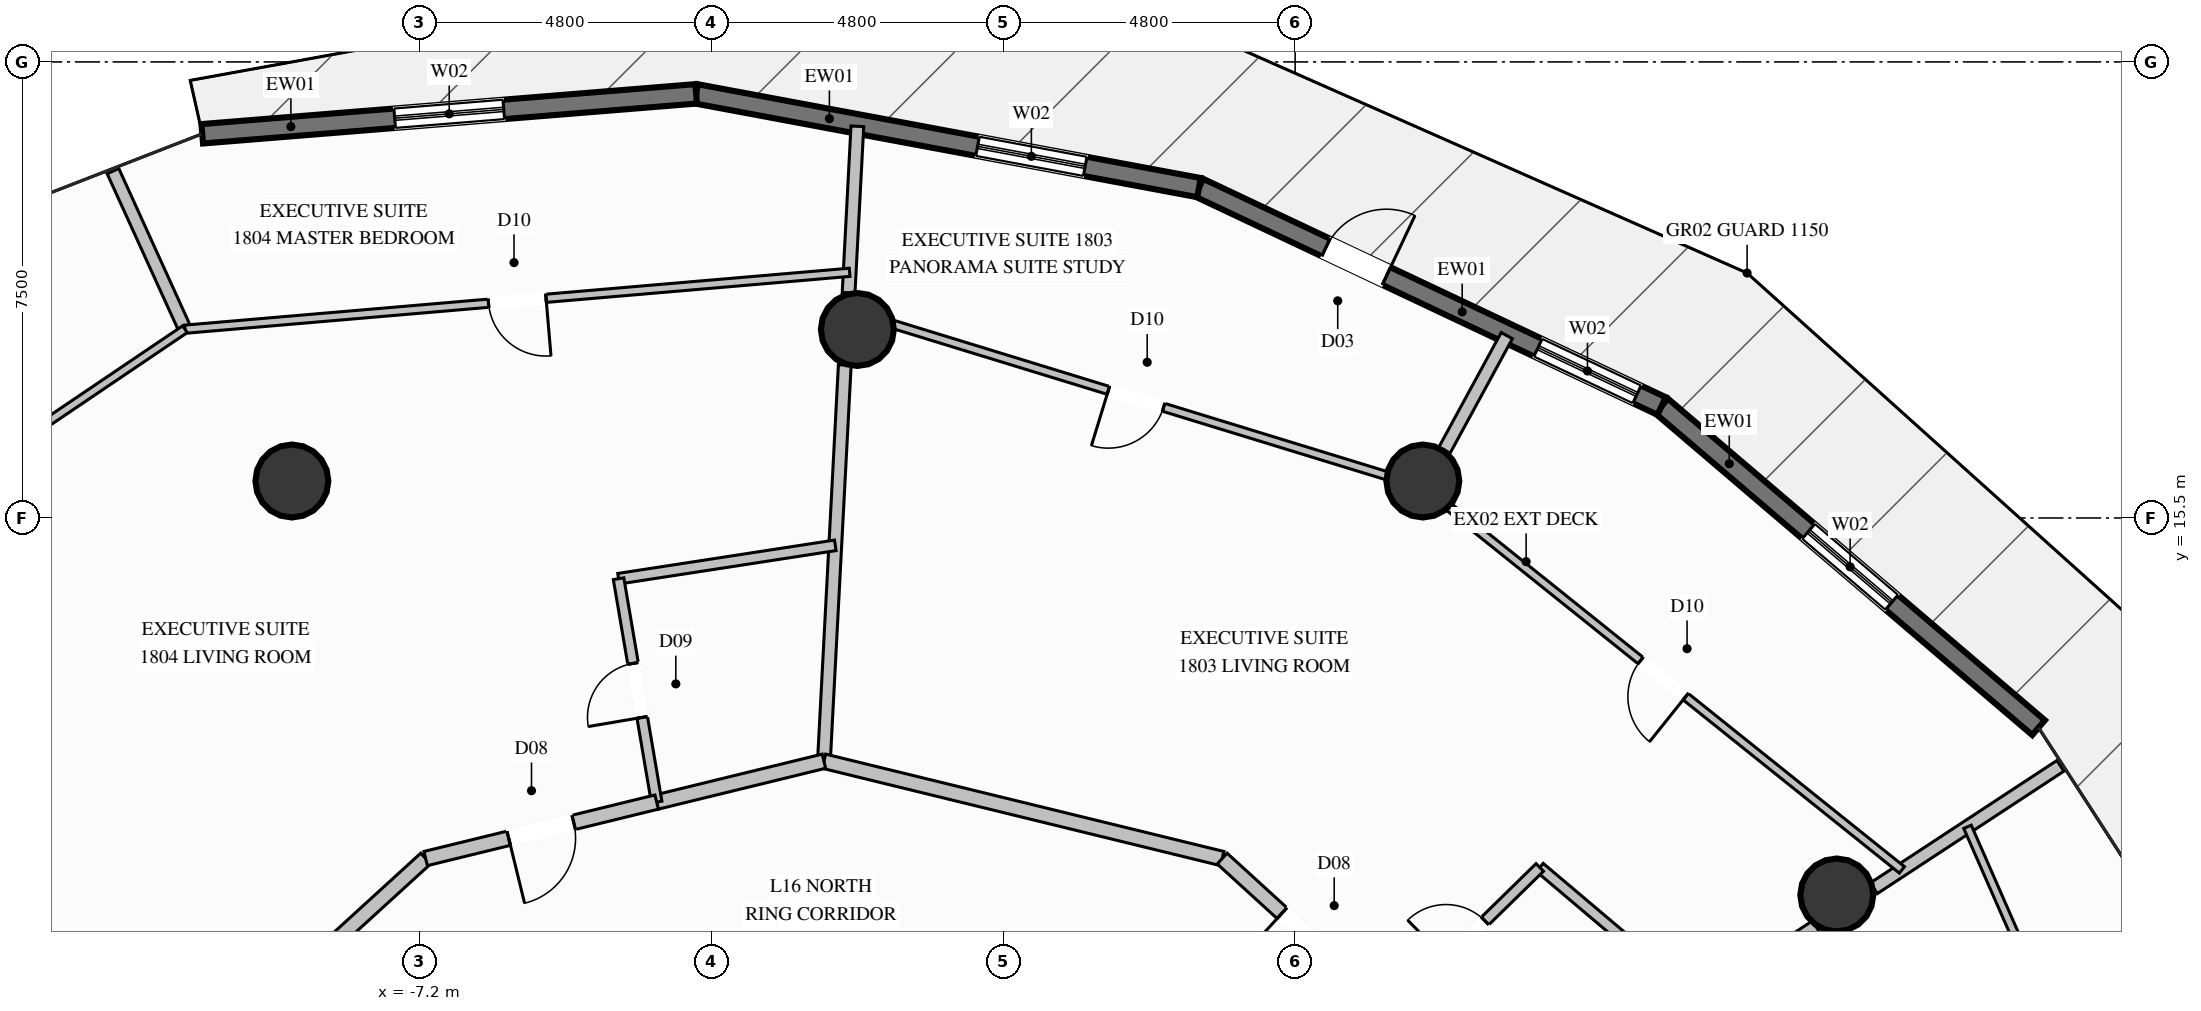
"""IFC4 building model, lengths in metres.
Left out: names, types, materials, properties, quantities, classifications, styles, units other than length and angle.
Written with IfcOpenShell. Run it as: python <this file> out.ifc"""

import sys

from ifc_helpers import new_model, si_unit, direction, frame, frame_2d, origin, origin_2d, place, context, subcontext, project, spatial, rectangle, circle, extrude, element, fill, save


model = new_model("IFC4")
c1 = context("Model", 3, precision=1e-05, world=origin(), true_north=direction((0.0, 1.0)))
c2 = subcontext(c1, "Body", "Model", "MODEL_VIEW")
j1 = project(units=[si_unit("LENGTHUNIT", "METRE"), si_unit("PLANEANGLEUNIT", "RADIAN")], contexts=[c1])
p1 = place(None, origin())
s1 = spatial("IfcSite", under=j1, at=p1, CompositionType="ELEMENT")
p2 = place(p1, origin())
s2 = spatial("IfcBuilding", under=s1, at=p2, CompositionType="ELEMENT")
p3 = place(p2, frame((0.0, 0.0, 68.0)))
s3 = spatial("IfcBuildingStorey", under=s2, at=p3, CompositionType="ELEMENT", Elevation=68.0)
for number, where, z_axis, x_axis in (
    (1, (16.108, 9.3, 0.0), (0.0, 0.0, 1.0), (1.0, 0.0, 0.0)),
    (2, (9.3, 16.108, 0.0), (0.0, 0.0, 1.0), (1.0, 0.0, 0.0)),
    (3, (0.0, 18.6, 0.0), (0.0, 0.0, 1.0), (1.0, 0.0, 0.0)),
    (4, (-9.3, 16.108, 0.0), (0.0, 0.0, 1.0), (1.0, 0.0, 0.0)),
):
    element("IfcColumn", number, at=place(p3, frame(where, z_axis=z_axis, x_axis=x_axis)), inside=s3, PredefinedType="COLUMN", context=c2, shape_type="SweptSolid", body=[
        extrude(circle(Radius=0.6, at=origin_2d()), origin(), (0.0, 0.0, 1.0), 3.6),
    ])
p4 = place(p3, frame((13.227, 17.341, 0.0), z_axis=(0.0, 0.0, 1.0), x_axis=(0.76078130933, -0.649008319958, 0.0)))
e5 = element("IfcWall", 5, at=p4, inside=s3, PredefinedType="SOLIDWALL", context=c2, shape_type="SweptSolid", body=[
    extrude(rectangle(XDim=8.149, YDim=0.32, at=frame_2d((4.075, 0.0))), origin(), (0.0, 0.0, 1.0), 3.34),
])
p5 = place(p4, frame((3.175, 0.0, 0.35)))
e6 = element("IfcOpeningElement", 6, at=p5, cuts=e5, PredefinedType="OPENING", context=c2, shape_type="SweptSolid", body=[
    extrude(rectangle(XDim=1.8, YDim=2.6, at=frame_2d((0.9, 1.3))), frame((0.0, 0.17, 0.0), z_axis=(0.0, -1.0, 0.0), x_axis=(1.0, 0.0, 0.0)), (0.0, 0.0, 1.0), 0.34),
])
p6 = place(p3, frame((5.619, 20.933, 0.0), z_axis=(0.0, 0.0, 1.0), x_axis=(0.904280701051, -0.426938419105, 0.0)))
e7 = element("IfcWall", 7, at=p6, inside=s3, PredefinedType="SOLIDWALL", context=c2, shape_type="SweptSolid", body=[
    extrude(rectangle(XDim=8.414, YDim=0.32, at=frame_2d((4.207, 0.0))), origin(), (0.0, 0.0, 1.0), 3.34),
])
p7 = place(p6, frame((6.165, 0.0, 0.35)))
e8 = element("IfcOpeningElement", 8, at=p7, cuts=e7, PredefinedType="OPENING", context=c2, shape_type="SweptSolid", body=[
    extrude(rectangle(XDim=1.8, YDim=2.6, at=frame_2d((0.9, 1.3))), frame((0.0, 0.17, 0.0), z_axis=(0.0, -1.0, 0.0), x_axis=(1.0, 0.0, 0.0)), (0.0, 0.0, 1.0), 0.34),
])
p8 = place(p6, frame((2.308, 0.0, 0.0)))
e9 = element("IfcOpeningElement", 9, at=p8, cuts=e7, PredefinedType="OPENING", context=c2, shape_type="SweptSolid", body=[
    extrude(rectangle(XDim=1.1, YDim=2.2, at=frame_2d((0.55, 1.1))), frame((0.0, 0.17, 0.0), z_axis=(0.0, -1.0, 0.0), x_axis=(1.0, 0.0, 0.0)), (0.0, 0.0, 1.0), 0.34),
])
p9 = place(p3, frame((-2.651, 22.475, 0.0), z_axis=(0.0, 0.0, 1.0), x_axis=(0.983056664979, -0.183301918815, 0.0)))
e10 = element("IfcWall", 10, at=p9, inside=s3, PredefinedType="SOLIDWALL", context=c2, shape_type="SweptSolid", body=[
    extrude(rectangle(XDim=8.412, YDim=0.32, at=frame_2d((4.206, 0.0))), origin(), (0.0, 0.0, 1.0), 3.34),
])
p10 = place(p9, frame((4.708, 0.0, 0.35)))
e11 = element("IfcOpeningElement", 11, at=p10, cuts=e10, PredefinedType="OPENING", context=c2, shape_type="SweptSolid", body=[
    extrude(rectangle(XDim=1.8, YDim=2.6, at=frame_2d((0.9, 1.3))), frame((0.0, 0.17, 0.0), z_axis=(0.0, -1.0, 0.0), x_axis=(1.0, 0.0, 0.0)), (0.0, 0.0, 1.0), 0.34),
])
p11 = place(p3, frame((-10.774, 21.818, 0.0), z_axis=(0.0, 0.0, 1.0), x_axis=(0.996745267641, 0.08061557812, 0.0)))
e12 = element("IfcWall", 12, at=p11, inside=s3, PredefinedType="SOLIDWALL", context=c2, shape_type="SweptSolid", body=[
    extrude(rectangle(XDim=8.15, YDim=0.32, at=frame_2d((4.075, 0.0))), origin(), (0.0, 0.0, 1.0), 3.34),
])
p12 = place(p11, frame((3.175, 0.0, 0.35)))
e13 = element("IfcOpeningElement", 13, at=p12, cuts=e12, PredefinedType="OPENING", context=c2, shape_type="SweptSolid", body=[
    extrude(rectangle(XDim=1.8, YDim=2.6, at=frame_2d((0.9, 1.3))), frame((0.0, 0.17, 0.0), z_axis=(0.0, -1.0, 0.0), x_axis=(1.0, 0.0, 0.0)), (0.0, 0.0, 1.0), 0.34),
])
p13 = place(p3, frame((10.795, 5.525, 0.0), z_axis=(0.0, 0.0, 1.0), x_axis=(0.836067345727, 0.548626825273, 0.0)))
e14 = element("IfcWall", 14, at=p13, inside=s3, PredefinedType="PARTITIONING", context=c2, shape_type="SweptSolid", body=[
    extrude(rectangle(XDim=5.942, YDim=0.21, at=frame_2d((2.971, 0.0))), origin(), (0.0, 0.0, 1.0), 2.709),
])
p14 = place(p3, frame((16.718, 9.411, 0.0), z_axis=(0.0, 0.0, 1.0), x_axis=(0.836061262726, 0.548636095212, 0.0)))
e15 = element("IfcWall", 15, at=p14, inside=s3, PredefinedType="PARTITIONING", context=c2, shape_type="SweptSolid", body=[
    extrude(rectangle(XDim=3.669, YDim=0.21, at=frame_2d((1.835, 0.0))), origin(), (0.0, 0.0, 1.0), 3.34),
])
p15 = place(p3, frame((-0.55, 11.5, 0.0), z_axis=(0.0, 0.0, 1.0), x_axis=(0.052578474705, 0.998616795371, 0.0)))
e16 = element("IfcWall", 16, at=p15, inside=s3, PredefinedType="PARTITIONING", context=c2, shape_type="SweptSolid", body=[
    extrude(rectangle(XDim=6.524, YDim=0.21, at=frame_2d((3.262, 0.0))), origin(), (0.0, 0.0, 1.0), 3.34),
])
p16 = place(p3, frame((-0.144, 19.203, 0.0), z_axis=(0.0, 0.0, 1.0), x_axis=(0.052535465428, 0.998619058937, 0.0)))
e17 = element("IfcWall", 17, at=p16, inside=s3, PredefinedType="PARTITIONING", context=c2, shape_type="SweptSolid", body=[
    extrude(rectangle(XDim=2.742, YDim=0.21, at=frame_2d((1.371, 0.0))), origin(), (0.0, 0.0, 1.0), 3.34),
])
p17 = place(p3, frame((22.863, -0.077, 0.0), z_axis=(0.0, 0.0, 1.0), x_axis=(-0.401711318502, 0.915766354802, 0.0)))
e18 = element("IfcWall", 18, at=p17, inside=s3, PredefinedType="PARTITIONING", context=c2, shape_type="SweptSolid", body=[
    extrude(rectangle(XDim=11.463, YDim=0.135, at=frame_2d((5.732, 0.0))), origin(), (0.0, 0.0, 1.0), 3.34),
])
p18 = place(p17, frame((5.257, 0.0, 0.0)))
e19 = element("IfcOpeningElement", 19, at=p18, cuts=e18, PredefinedType="OPENING", context=c2, shape_type="SweptSolid", body=[
    extrude(rectangle(XDim=0.95, YDim=2.1, at=frame_2d((0.475, 1.05))), frame((0.0, 0.078, 0.0), z_axis=(0.0, -1.0, 0.0), x_axis=(1.0, 0.0, 0.0)), (0.0, 0.0, 1.0), 0.155),
])
p19 = place(p3, frame((13.852, 7.531, 0.0), z_axis=(0.0, 0.0, 1.0), x_axis=(-0.76377891562, 0.645477937697, 0.0)))
e20 = element("IfcWall", 20, at=p19, inside=s3, PredefinedType="PLUMBINGWALL", context=c2, shape_type="SweptSolid", body=[
    extrude(rectangle(XDim=3.442, YDim=0.175, at=frame_2d((1.721, 0.0))), origin(), (0.0, 0.0, 1.0), 3.34),
])
p20 = place(p3, frame((8.781, 7.362, 0.0), z_axis=(0.0, 0.0, 1.0), x_axis=(0.714532745867, 0.699601997628, 0.0)))
e21 = element("IfcWall", 21, at=p20, inside=s3, PredefinedType="PLUMBINGWALL", context=c2, shape_type="SweptSolid", body=[
    extrude(rectangle(XDim=3.417, YDim=0.175, at=frame_2d((1.709, 0.0))), origin(), (0.0, 0.0, 1.0), 2.709),
])
p21 = place(p20, frame((1.259, 0.0, 0.0)))
e22 = element("IfcOpeningElement", 22, at=p21, cuts=e21, PredefinedType="OPENING", context=c2, shape_type="SweptSolid", body=[
    extrude(rectangle(XDim=0.9, YDim=2.1, at=frame_2d((0.45, 1.05))), frame((0.0, 0.098, 0.0), z_axis=(0.0, -1.0, 0.0), x_axis=(1.0, 0.0, 0.0)), (0.0, 0.0, 1.0), 0.195),
])
p22 = place(p3, frame((9.656, 16.615, 0.0), z_axis=(0.0, 0.0, 1.0), x_axis=(0.477862874023, 0.878434444697, 0.0)))
e23 = element("IfcWall", 23, at=p22, inside=s3, PredefinedType="PARTITIONING", context=c2, shape_type="SweptSolid", body=[
    extrude(rectangle(XDim=2.145, YDim=0.21, at=frame_2d((1.072, 0.0))), origin(), (0.0, 0.0, 1.0), 3.34),
])
p23 = place(p3, frame((6.0, 9.899, 0.0), z_axis=(0.0, 0.0, 1.0), x_axis=(-0.971400676792, 0.237446257348, 0.0)))
e24 = element("IfcWall", 24, at=p23, inside=s3, PredefinedType="PARTITIONING", context=c2, shape_type="SweptSolid", body=[
    extrude(rectangle(XDim=6.743, YDim=0.24, at=frame_2d((3.372, 0.0))), origin(), (0.0, 0.0, 1.0), 3.34),
])
p24 = place(p3, frame((8.781, 7.362, 0.0), z_axis=(0.0, 0.0, 1.0), x_axis=(-0.738791518375, 0.673934041562, 0.0)))
e25 = element("IfcWall", 25, at=p24, inside=s3, PredefinedType="PARTITIONING", context=c2, shape_type="SweptSolid", body=[
    extrude(rectangle(XDim=3.764, YDim=0.24, at=frame_2d((1.882, 0.0))), origin(), (0.0, 0.0, 1.0), 3.34),
])
p25 = place(p24, frame((1.332, 0.0, 0.0)))
e26 = element("IfcOpeningElement", 26, at=p25, cuts=e25, PredefinedType="OPENING", context=c2, shape_type="SweptSolid", body=[
    extrude(rectangle(XDim=1.1, YDim=2.3, at=frame_2d((0.55, 1.15))), frame((0.0, 0.13, 0.0), z_axis=(0.0, -1.0, 0.0), x_axis=(1.0, 0.0, 0.0)), (0.0, 0.0, 1.0), 0.26),
])
p26 = place(p3, frame((17.179, 9.713, 0.0), z_axis=(0.0, 0.0, 1.0), x_axis=(-0.780480528916, 0.625180089241, 0.0)))
e27 = element("IfcWall", 27, at=p26, inside=s3, PredefinedType="PARTITIONING", context=c2, shape_type="SweptSolid", body=[
    extrude(rectangle(XDim=10.064, YDim=0.135, at=frame_2d((5.032, 0.0))), origin(), (0.0, 0.0, 1.0), 2.793),
])
p27 = place(p26, frame((4.557, 0.0, 0.0)))
e28 = element("IfcOpeningElement", 28, at=p27, cuts=e27, PredefinedType="OPENING", context=c2, shape_type="SweptSolid", body=[
    extrude(rectangle(XDim=0.95, YDim=2.1, at=frame_2d((0.475, 1.05))), frame((0.0, 0.078, 0.0), z_axis=(0.0, -1.0, 0.0), x_axis=(1.0, 0.0, 0.0)), (0.0, 0.0, 1.0), 0.155),
])
p28 = place(p3, frame((9.324, 16.005, 0.0), z_axis=(0.0, 0.0, 1.0), x_axis=(-0.956059543069, 0.29317256029, 0.0)))
e29 = element("IfcWall", 29, at=p28, inside=s3, PredefinedType="PARTITIONING", context=c2, shape_type="SweptSolid", body=[
    extrude(rectangle(XDim=9.92, YDim=0.135, at=frame_2d((4.96, 0.0))), origin(), (0.0, 0.0, 1.0), 2.793),
])
p29 = place(p28, frame((4.485, 0.0, 0.0)))
e30 = element("IfcOpeningElement", 30, at=p29, cuts=e29, PredefinedType="OPENING", context=c2, shape_type="SweptSolid", body=[
    extrude(rectangle(XDim=0.95, YDim=2.1, at=frame_2d((0.475, 1.05))), frame((0.0, 0.078, 0.0), z_axis=(0.0, -1.0, 0.0), x_axis=(1.0, 0.0, 0.0)), (0.0, 0.0, 1.0), 0.155),
])
p30 = place(p3, frame((-0.55, 11.5, 0.0), z_axis=(0.0, 0.0, 1.0), x_axis=(-0.971426839663, -0.237339198579, 0.0)))
e31 = element("IfcWall", 31, at=p30, inside=s3, PredefinedType="PARTITIONING", context=c2, shape_type="SweptSolid", body=[
    extrude(rectangle(XDim=2.832, YDim=0.24, at=frame_2d((1.416, 0.0))), origin(), (0.0, 0.0, 1.0), 3.34),
])
p31 = place(p3, frame((-0.363, 15.05, 0.0), z_axis=(0.0, 0.0, 1.0), x_axis=(-0.988339584837, -0.152265771085, 0.0)))
e32 = element("IfcWall", 32, at=p31, inside=s3, PredefinedType="PLUMBINGWALL", context=c2, shape_type="SweptSolid", body=[
    extrude(rectangle(XDim=3.606, YDim=0.175, at=frame_2d((1.803, 0.0))), origin(), (0.0, 0.0, 1.0), 3.34),
])
p32 = place(p3, frame((-3.301, 10.828, 0.0), z_axis=(0.0, 0.0, 1.0), x_axis=(-0.167999861504, 0.985787018851, 0.0)))
e33 = element("IfcWall", 33, at=p32, inside=s3, PredefinedType="PLUMBINGWALL", context=c2, shape_type="SweptSolid", body=[
    extrude(rectangle(XDim=3.726, YDim=0.175, at=frame_2d((1.863, 0.0))), origin(), (0.0, 0.0, 1.0), 3.34),
])
p33 = place(p32, frame((1.413, 0.0, 0.0)))
e34 = element("IfcOpeningElement", 34, at=p33, cuts=e33, PredefinedType="OPENING", context=c2, shape_type="SweptSolid", body=[
    extrude(rectangle(XDim=0.9, YDim=2.1, at=frame_2d((0.45, 1.05))), frame((0.0, 0.098, 0.0), z_axis=(0.0, -1.0, 0.0), x_axis=(1.0, 0.0, 0.0)), (0.0, 0.0, 1.0), 0.195),
])
p34 = place(p3, frame((-11.059, 18.604, 0.0), z_axis=(0.0, 0.0, 1.0), x_axis=(-0.414092695147, 0.910234716887, 0.0)))
e35 = element("IfcWall", 35, at=p34, inside=s3, PredefinedType="PARTITIONING", context=c2, shape_type="SweptSolid", body=[
    extrude(rectangle(XDim=2.856, YDim=0.21, at=frame_2d((1.428, 0.0))), origin(), (0.0, 0.0, 1.0), 3.34),
])
p35 = place(p3, frame((-7.1, 9.899, 0.0), z_axis=(0.0, 0.0, 1.0), x_axis=(-0.73878836807, -0.673937495028, 0.0)))
e36 = element("IfcWall", 36, at=p35, inside=s3, PredefinedType="PARTITIONING", context=c2, shape_type="SweptSolid", body=[
    extrude(rectangle(XDim=6.49, YDim=0.24, at=frame_2d((3.245, 0.0))), origin(), (0.0, 0.0, 1.0), 3.34),
])
p36 = place(p3, frame((-3.301, 10.828, 0.0), z_axis=(0.0, 0.0, 1.0), x_axis=(-0.971381725301, -0.237523775128, 0.0)))
e37 = element("IfcWall", 37, at=p36, inside=s3, PredefinedType="PARTITIONING", context=c2, shape_type="SweptSolid", body=[
    extrude(rectangle(XDim=3.911, YDim=0.24, at=frame_2d((1.956, 0.0))), origin(), (0.0, 0.0, 1.0), 3.34),
])
p37 = place(p36, frame((1.405, 0.0, 0.0)))
e38 = element("IfcOpeningElement", 38, at=p37, cuts=e37, PredefinedType="OPENING", context=c2, shape_type="SweptSolid", body=[
    extrude(rectangle(XDim=1.1, YDim=2.3, at=frame_2d((0.55, 1.15))), frame((0.0, 0.13, 0.0), z_axis=(0.0, -1.0, 0.0), x_axis=(1.0, 0.0, 0.0)), (0.0, 0.0, 1.0), 0.26),
])
p38 = place(p3, frame((-0.127, 19.54, 0.0), z_axis=(0.0, 0.0, 1.0), x_axis=(-0.996354434544, -0.085310261781, 0.0)))
e39 = element("IfcWall", 39, at=p38, inside=s3, PredefinedType="PARTITIONING", context=c2, shape_type="SweptSolid", body=[
    extrude(rectangle(XDim=10.972, YDim=0.135, at=frame_2d((5.486, 0.0))), origin(), (0.0, 0.0, 1.0), 3.34),
])
p39 = place(p38, frame((5.011, 0.0, 0.0)))
e40 = element("IfcOpeningElement", 40, at=p39, cuts=e39, PredefinedType="OPENING", context=c2, shape_type="SweptSolid", body=[
    extrude(rectangle(XDim=0.95, YDim=2.1, at=frame_2d((0.475, 1.05))), frame((0.0, 0.078, 0.0), z_axis=(0.0, -1.0, 0.0), x_axis=(1.0, 0.0, 0.0)), (0.0, 0.0, 1.0), 0.155),
])
p40 = place(p3, frame((-11.059, 18.604, 0.0), z_axis=(0.0, 0.0, 1.0), x_axis=(-0.828635640213, -0.559788331219, 0.0)))
e41 = element("IfcWall", 41, at=p40, inside=s3, PredefinedType="PARTITIONING", context=c2, shape_type="SweptSolid", body=[
    extrude(rectangle(XDim=12.067, YDim=0.135, at=frame_2d((6.033, 0.0))), origin(), (0.0, 0.0, 1.0), 3.34),
])
p41 = place(p40, frame((5.558, 0.0, 0.0)))
e42 = element("IfcOpeningElement", 42, at=p41, cuts=e41, PredefinedType="OPENING", context=c2, shape_type="SweptSolid", body=[
    extrude(rectangle(XDim=0.95, YDim=2.1, at=frame_2d((0.475, 1.05))), frame((0.0, 0.078, 0.0), z_axis=(0.0, -1.0, 0.0), x_axis=(1.0, 0.0, 0.0)), (0.0, 0.0, 1.0), 0.155),
])
p42 = place(p5, origin())
e43 = element("IfcWindow", 43, at=p42, inside=s3, PartitioningType="SINGLE_PANEL", PredefinedType="WINDOW", context=c2, shape_type="SweptSolid", body=[
    extrude(rectangle(XDim=1.8, YDim=2.6, at=frame_2d((0.9, 1.3))), frame((0.0, 0.03, 0.0), z_axis=(0.0, -1.0, 0.0), x_axis=(1.0, 0.0, 0.0)), (0.0, 0.0, 1.0), 0.06),
])
fill(e6, e43)
p43 = place(p7, origin())
e44 = element("IfcWindow", 44, at=p43, inside=s3, PartitioningType="SINGLE_PANEL", PredefinedType="WINDOW", context=c2, shape_type="SweptSolid", body=[
    extrude(rectangle(XDim=1.8, YDim=2.6, at=frame_2d((0.9, 1.3))), frame((0.0, 0.03, 0.0), z_axis=(0.0, -1.0, 0.0), x_axis=(1.0, 0.0, 0.0)), (0.0, 0.0, 1.0), 0.06),
])
fill(e8, e44)
p44 = place(p8, origin())
e45 = element("IfcDoor", 45, at=p44, inside=s3, OperationType="SINGLE_SWING_RIGHT", PredefinedType="DOOR", context=c2, shape_type="SweptSolid", body=[
    extrude(rectangle(XDim=1.1, YDim=2.2, at=frame_2d((0.55, 1.1))), frame((0.0, 0.025, 0.0), z_axis=(0.0, -1.0, 0.0), x_axis=(1.0, 0.0, 0.0)), (0.0, 0.0, 1.0), 0.05),
])
fill(e9, e45)
p45 = place(p10, origin())
e46 = element("IfcWindow", 46, at=p45, inside=s3, PartitioningType="SINGLE_PANEL", PredefinedType="WINDOW", context=c2, shape_type="SweptSolid", body=[
    extrude(rectangle(XDim=1.8, YDim=2.6, at=frame_2d((0.9, 1.3))), frame((0.0, 0.03, 0.0), z_axis=(0.0, -1.0, 0.0), x_axis=(1.0, 0.0, 0.0)), (0.0, 0.0, 1.0), 0.06),
])
fill(e11, e46)
p46 = place(p12, origin())
e47 = element("IfcWindow", 47, at=p46, inside=s3, PartitioningType="SINGLE_PANEL", PredefinedType="WINDOW", context=c2, shape_type="SweptSolid", body=[
    extrude(rectangle(XDim=1.8, YDim=2.6, at=frame_2d((0.9, 1.3))), frame((0.0, 0.03, 0.0), z_axis=(0.0, -1.0, 0.0), x_axis=(1.0, 0.0, 0.0)), (0.0, 0.0, 1.0), 0.06),
])
fill(e13, e47)
p47 = place(p21, origin())
e48 = element("IfcDoor", 48, at=p47, inside=s3, OperationType="SINGLE_SWING_LEFT", PredefinedType="DOOR", context=c2, shape_type="SweptSolid", body=[
    extrude(rectangle(XDim=0.9, YDim=2.1, at=frame_2d((0.45, 1.05))), frame((0.0, 0.025, 0.0), z_axis=(0.0, -1.0, 0.0), x_axis=(1.0, 0.0, 0.0)), (0.0, 0.0, 1.0), 0.05),
])
fill(e22, e48)
p48 = place(p25, origin())
e49 = element("IfcDoor", 49, at=p48, inside=s3, OperationType="SINGLE_SWING_RIGHT", PredefinedType="DOOR", context=c2, shape_type="SweptSolid", body=[
    extrude(rectangle(XDim=1.1, YDim=2.3, at=frame_2d((0.55, 1.15))), frame((0.0, 0.025, 0.0), z_axis=(0.0, -1.0, 0.0), x_axis=(1.0, 0.0, 0.0)), (0.0, 0.0, 1.0), 0.05),
])
fill(e26, e49)
p49 = place(p27, origin())
e50 = element("IfcDoor", 50, at=p49, inside=s3, OperationType="SINGLE_SWING_LEFT", PredefinedType="DOOR", context=c2, shape_type="SweptSolid", body=[
    extrude(rectangle(XDim=0.95, YDim=2.1, at=frame_2d((0.475, 1.05))), frame((0.0, 0.025, 0.0), z_axis=(0.0, -1.0, 0.0), x_axis=(1.0, 0.0, 0.0)), (0.0, 0.0, 1.0), 0.05),
])
fill(e28, e50)
p50 = place(p29, origin())
e51 = element("IfcDoor", 51, at=p50, inside=s3, OperationType="SINGLE_SWING_RIGHT", PredefinedType="DOOR", context=c2, shape_type="SweptSolid", body=[
    extrude(rectangle(XDim=0.95, YDim=2.1, at=frame_2d((0.475, 1.05))), frame((0.0, 0.025, 0.0), z_axis=(0.0, -1.0, 0.0), x_axis=(1.0, 0.0, 0.0)), (0.0, 0.0, 1.0), 0.05),
])
fill(e30, e51)
p51 = place(p33, origin())
e52 = element("IfcDoor", 52, at=p51, inside=s3, OperationType="SINGLE_SWING_LEFT", PredefinedType="DOOR", context=c2, shape_type="SweptSolid", body=[
    extrude(rectangle(XDim=0.9, YDim=2.1, at=frame_2d((0.45, 1.05))), frame((0.0, 0.025, 0.0), z_axis=(0.0, -1.0, 0.0), x_axis=(1.0, 0.0, 0.0)), (0.0, 0.0, 1.0), 0.05),
])
fill(e34, e52)
p52 = place(p37, origin())
e53 = element("IfcDoor", 53, at=p52, inside=s3, OperationType="SINGLE_SWING_RIGHT", PredefinedType="DOOR", context=c2, shape_type="SweptSolid", body=[
    extrude(rectangle(XDim=1.1, YDim=2.3, at=frame_2d((0.55, 1.15))), frame((0.0, 0.025, 0.0), z_axis=(0.0, -1.0, 0.0), x_axis=(1.0, 0.0, 0.0)), (0.0, 0.0, 1.0), 0.05),
])
fill(e38, e53)
p53 = place(p39, origin())
e54 = element("IfcDoor", 54, at=p53, inside=s3, OperationType="SINGLE_SWING_LEFT", PredefinedType="DOOR", context=c2, shape_type="SweptSolid", body=[
    extrude(rectangle(XDim=0.95, YDim=2.1, at=frame_2d((0.475, 1.05))), frame((0.0, 0.025, 0.0), z_axis=(0.0, -1.0, 0.0), x_axis=(1.0, 0.0, 0.0)), (0.0, 0.0, 1.0), 0.05),
])
fill(e40, e54)
save(model, sys.argv[1])
